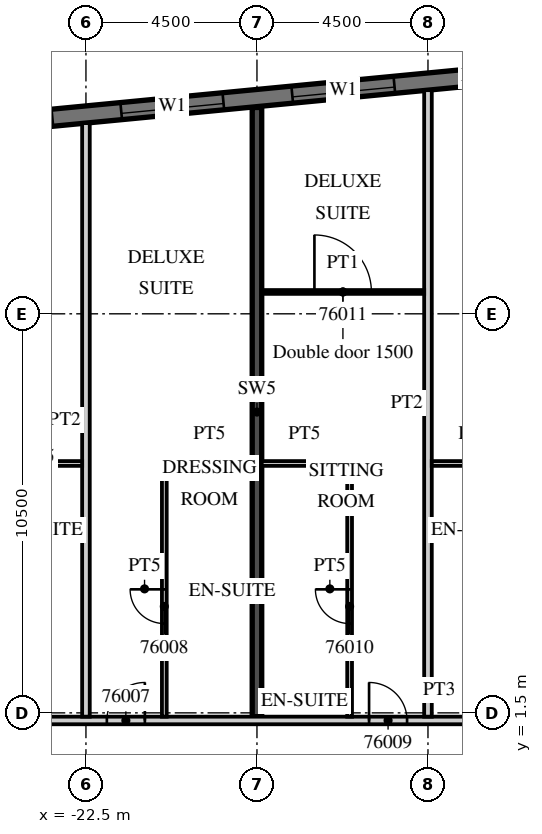
"""IFC4 building model, lengths in metres.
Left out: names, types, materials, properties, quantities, classifications, styles, units other than length and angle.
Written with IfcOpenShell. Run it as: python <this file> out.ifc"""

import sys

from ifc_helpers import new_model, si_unit, direction, frame, frame_2d, origin, place, context, subcontext, project, spatial, rectangle, extrude, element, fill, save


model = new_model("IFC4")
c1 = context("Model", 3, precision=1e-05, world=origin(), true_north=direction((0.0, 1.0)))
c2 = subcontext(c1, "Body", "Model", "MODEL_VIEW")
j1 = project(units=[si_unit("LENGTHUNIT", "METRE"), si_unit("PLANEANGLEUNIT", "RADIAN")], contexts=[c1])
p1 = place(None, origin())
s1 = spatial("IfcSite", under=j1, at=p1, CompositionType="ELEMENT")
p2 = place(p1, origin())
s2 = spatial("IfcBuilding", under=s1, at=p2, CompositionType="ELEMENT")
p3 = place(p2, frame((0.0, 0.0, 301.5)))
s3 = spatial("IfcBuildingStorey", under=s2, at=p3, CompositionType="ELEMENT", Elevation=301.5)
p4 = place(p3, frame((-18.0, 1.4, 0.0), z_axis=(0.0, 0.0, 1.0), x_axis=(0.0, 1.0, 0.0)))
e1 = element("IfcWall", 1, at=p4, inside=s3, PredefinedType="SHEAR", context=c2, shape_type="SweptSolid", body=[
    extrude(rectangle(XDim=16.03, YDim=0.25, at=frame_2d((8.015, 0.0))), origin(), (0.0, 0.0, 1.0), 3.3),
])
p5 = place(p3, frame((13.521, 20.713, 0.0), z_axis=(0.0, 0.0, 1.0), x_axis=(-0.995396277313, -0.095844932638, 0.0)))
e2 = element("IfcWall", 2, at=p5, inside=s3, PredefinedType="SOLIDWALL", context=c2, shape_type="SweptSolid", body=[
    extrude(rectangle(XDim=51.495, YDim=0.45, at=frame_2d((25.748, 0.0))), origin(), (0.0, 0.0, 1.0), 3.02),
])
p6 = place(p5, frame((0.91, 0.0, 0.45)))
e3 = element("IfcOpeningElement", 3, at=p6, cuts=e2, PredefinedType="OPENING", context=c2, shape_type="SweptSolid", body=[
    extrude(rectangle(XDim=2.7, YDim=2.25, at=frame_2d((1.35, 1.125))), frame((0.0, 0.235, 0.0), z_axis=(0.0, -1.0, 0.0), x_axis=(1.0, 0.0, 0.0)), (0.0, 0.0, 1.0), 0.47),
])
p7 = place(p5, frame((5.431, 0.0, 0.45)))
e4 = element("IfcOpeningElement", 4, at=p7, cuts=e2, PredefinedType="OPENING", context=c2, shape_type="SweptSolid", body=[
    extrude(rectangle(XDim=2.7, YDim=2.25, at=frame_2d((1.35, 1.125))), frame((0.0, 0.235, 0.0), z_axis=(0.0, -1.0, 0.0), x_axis=(1.0, 0.0, 0.0)), (0.0, 0.0, 1.0), 0.47),
])
p8 = place(p5, frame((9.952, 0.0, 0.45)))
e5 = element("IfcOpeningElement", 5, at=p8, cuts=e2, PredefinedType="OPENING", context=c2, shape_type="SweptSolid", body=[
    extrude(rectangle(XDim=2.7, YDim=2.25, at=frame_2d((1.35, 1.125))), frame((0.0, 0.235, 0.0), z_axis=(0.0, -1.0, 0.0), x_axis=(1.0, 0.0, 0.0)), (0.0, 0.0, 1.0), 0.47),
])
p9 = place(p5, frame((14.473, 0.0, 0.45)))
e6 = element("IfcOpeningElement", 6, at=p9, cuts=e2, PredefinedType="OPENING", context=c2, shape_type="SweptSolid", body=[
    extrude(rectangle(XDim=2.7, YDim=2.25, at=frame_2d((1.35, 1.125))), frame((0.0, 0.235, 0.0), z_axis=(0.0, -1.0, 0.0), x_axis=(1.0, 0.0, 0.0)), (0.0, 0.0, 1.0), 0.47),
])
p10 = place(p5, frame((18.994, 0.0, 0.45)))
e7 = element("IfcOpeningElement", 7, at=p10, cuts=e2, PredefinedType="OPENING", context=c2, shape_type="SweptSolid", body=[
    extrude(rectangle(XDim=2.7, YDim=2.25, at=frame_2d((1.35, 1.125))), frame((0.0, 0.235, 0.0), z_axis=(0.0, -1.0, 0.0), x_axis=(1.0, 0.0, 0.0)), (0.0, 0.0, 1.0), 0.47),
])
p11 = place(p5, frame((23.514, 0.0, 0.45)))
e8 = element("IfcOpeningElement", 8, at=p11, cuts=e2, PredefinedType="OPENING", context=c2, shape_type="SweptSolid", body=[
    extrude(rectangle(XDim=2.7, YDim=2.25, at=frame_2d((1.35, 1.125))), frame((0.0, 0.235, 0.0), z_axis=(0.0, -1.0, 0.0), x_axis=(1.0, 0.0, 0.0)), (0.0, 0.0, 1.0), 0.47),
])
p12 = place(p5, frame((28.035, 0.0, 0.45)))
e9 = element("IfcOpeningElement", 9, at=p12, cuts=e2, PredefinedType="OPENING", context=c2, shape_type="SweptSolid", body=[
    extrude(rectangle(XDim=2.7, YDim=2.25, at=frame_2d((1.35, 1.125))), frame((0.0, 0.235, 0.0), z_axis=(0.0, -1.0, 0.0), x_axis=(1.0, 0.0, 0.0)), (0.0, 0.0, 1.0), 0.47),
])
p13 = place(p5, frame((32.556, 0.0, 0.45)))
e10 = element("IfcOpeningElement", 10, at=p13, cuts=e2, PredefinedType="OPENING", context=c2, shape_type="SweptSolid", body=[
    extrude(rectangle(XDim=2.7, YDim=2.25, at=frame_2d((1.35, 1.125))), frame((0.0, 0.235, 0.0), z_axis=(0.0, -1.0, 0.0), x_axis=(1.0, 0.0, 0.0)), (0.0, 0.0, 1.0), 0.47),
])
p14 = place(p5, frame((37.077, 0.0, 0.45)))
e11 = element("IfcOpeningElement", 11, at=p14, cuts=e2, PredefinedType="OPENING", context=c2, shape_type="SweptSolid", body=[
    extrude(rectangle(XDim=2.7, YDim=2.25, at=frame_2d((1.35, 1.125))), frame((0.0, 0.235, 0.0), z_axis=(0.0, -1.0, 0.0), x_axis=(1.0, 0.0, 0.0)), (0.0, 0.0, 1.0), 0.47),
])
p15 = place(p5, frame((41.598, 0.0, 0.45)))
e12 = element("IfcOpeningElement", 12, at=p15, cuts=e2, PredefinedType="OPENING", context=c2, shape_type="SweptSolid", body=[
    extrude(rectangle(XDim=2.7, YDim=2.25, at=frame_2d((1.35, 1.125))), frame((0.0, 0.235, 0.0), z_axis=(0.0, -1.0, 0.0), x_axis=(1.0, 0.0, 0.0)), (0.0, 0.0, 1.0), 0.47),
])
p16 = place(p5, frame((46.118, 0.0, 0.45)))
e13 = element("IfcOpeningElement", 13, at=p16, cuts=e2, PredefinedType="OPENING", context=c2, shape_type="SweptSolid", body=[
    extrude(rectangle(XDim=2.7, YDim=2.25, at=frame_2d((1.35, 1.125))), frame((0.0, 0.235, 0.0), z_axis=(0.0, -1.0, 0.0), x_axis=(1.0, 0.0, 0.0)), (0.0, 0.0, 1.0), 0.47),
])
p17 = place(p3, frame((-39.909, 1.3, 0.0), z_axis=(0.0, 0.0, 1.0), x_axis=(1.0, 0.0, 0.0)))
e14 = element("IfcWall", 14, at=p17, inside=s3, PredefinedType="PARTITIONING", context=c2, shape_type="SweptSolid", body=[
    extrude(rectangle(XDim=53.409, YDim=0.2, at=frame_2d((26.705, 0.0))), origin(), (0.0, 0.0, 1.0), 3.02),
])
p18 = place(p17, frame((0.15, 0.0, 0.0)))
e15 = element("IfcOpeningElement", 15, at=p18, cuts=e14, PredefinedType="OPENING", context=c2, shape_type="SweptSolid", body=[
    extrude(rectangle(XDim=0.9, YDim=2.1, at=frame_2d((0.45, 1.05))), frame((0.0, 0.11, 0.0), z_axis=(0.0, -1.0, 0.0), x_axis=(1.0, 0.0, 0.0)), (0.0, 0.0, 1.0), 0.22),
])
p19 = place(p17, frame((9.271, 0.0, 0.0)))
e16 = element("IfcOpeningElement", 16, at=p19, cuts=e14, PredefinedType="OPENING", context=c2, shape_type="SweptSolid", body=[
    extrude(rectangle(XDim=1.2, YDim=2.1, at=frame_2d((0.6, 1.05))), frame((0.0, 0.11, 0.0), z_axis=(0.0, -1.0, 0.0), x_axis=(1.0, 0.0, 0.0)), (0.0, 0.0, 1.0), 0.22),
])
p20 = place(p17, frame((13.484, 0.0, 0.0)))
e17 = element("IfcOpeningElement", 17, at=p20, cuts=e14, PredefinedType="OPENING", context=c2, shape_type="SweptSolid", body=[
    extrude(rectangle(XDim=1.0, YDim=2.1, at=frame_2d((0.5, 1.05))), frame((0.0, 0.11, 0.0), z_axis=(0.0, -1.0, 0.0), x_axis=(1.0, 0.0, 0.0)), (0.0, 0.0, 1.0), 0.22),
])
p21 = place(p17, frame((17.959, 0.0, 0.0)))
e18 = element("IfcOpeningElement", 18, at=p21, cuts=e14, PredefinedType="OPENING", context=c2, shape_type="SweptSolid", body=[
    extrude(rectangle(XDim=1.0, YDim=2.1, at=frame_2d((0.5, 1.05))), frame((0.0, 0.11, 0.0), z_axis=(0.0, -1.0, 0.0), x_axis=(1.0, 0.0, 0.0)), (0.0, 0.0, 1.0), 0.22),
])
p22 = place(p17, frame((24.859, 0.0, 0.0)))
e19 = element("IfcOpeningElement", 19, at=p22, cuts=e14, PredefinedType="OPENING", context=c2, shape_type="SweptSolid", body=[
    extrude(rectangle(XDim=1.0, YDim=2.1, at=frame_2d((0.5, 1.05))), frame((0.0, 0.11, 0.0), z_axis=(0.0, -1.0, 0.0), x_axis=(1.0, 0.0, 0.0)), (0.0, 0.0, 1.0), 0.22),
])
p23 = place(p17, frame((29.334, 0.0, 0.0)))
e20 = element("IfcOpeningElement", 20, at=p23, cuts=e14, PredefinedType="OPENING", context=c2, shape_type="SweptSolid", body=[
    extrude(rectangle(XDim=1.0, YDim=2.1, at=frame_2d((0.5, 1.05))), frame((0.0, 0.11, 0.0), z_axis=(0.0, -1.0, 0.0), x_axis=(1.0, 0.0, 0.0)), (0.0, 0.0, 1.0), 0.22),
])
p24 = place(p17, frame((36.271, 0.0, 0.0)))
e21 = element("IfcOpeningElement", 21, at=p24, cuts=e14, PredefinedType="OPENING", context=c2, shape_type="SweptSolid", body=[
    extrude(rectangle(XDim=1.2, YDim=2.1, at=frame_2d((0.6, 1.05))), frame((0.0, 0.11, 0.0), z_axis=(0.0, -1.0, 0.0), x_axis=(1.0, 0.0, 0.0)), (0.0, 0.0, 1.0), 0.22),
])
p25 = place(p17, frame((40.484, 0.0, 0.0)))
e22 = element("IfcOpeningElement", 22, at=p25, cuts=e14, PredefinedType="OPENING", context=c2, shape_type="SweptSolid", body=[
    extrude(rectangle(XDim=1.0, YDim=2.1, at=frame_2d((0.5, 1.05))), frame((0.0, 0.11, 0.0), z_axis=(0.0, -1.0, 0.0), x_axis=(1.0, 0.0, 0.0)), (0.0, 0.0, 1.0), 0.22),
])
p26 = place(p17, frame((47.334, 0.0, 0.0)))
e23 = element("IfcOpeningElement", 23, at=p26, cuts=e14, PredefinedType="OPENING", context=c2, shape_type="SweptSolid", body=[
    extrude(rectangle(XDim=1.0, YDim=2.1, at=frame_2d((0.5, 1.05))), frame((0.0, 0.11, 0.0), z_axis=(0.0, -1.0, 0.0), x_axis=(1.0, 0.0, 0.0)), (0.0, 0.0, 1.0), 0.22),
])
p27 = place(p17, frame((51.834, 0.0, 0.0)))
e24 = element("IfcOpeningElement", 24, at=p27, cuts=e14, PredefinedType="OPENING", context=c2, shape_type="SweptSolid", body=[
    extrude(rectangle(XDim=1.0, YDim=2.1, at=frame_2d((0.5, 1.05))), frame((0.0, 0.11, 0.0), z_axis=(0.0, -1.0, 0.0), x_axis=(1.0, 0.0, 0.0)), (0.0, 0.0, 1.0), 0.22),
])
p28 = place(p3, frame((-22.5, 1.4, 0.0), z_axis=(0.0, 0.0, 1.0), x_axis=(0.0, 1.0, 0.0)))
e25 = element("IfcWall", 25, at=p28, inside=s3, PredefinedType="PARTITIONING", context=c2, shape_type="SweptSolid", body=[
    extrude(rectangle(XDim=15.618, YDim=0.2, at=frame_2d((7.809, 0.0))), origin(), (0.0, 0.0, 1.0), 3.02),
])
p29 = place(p3, frame((-24.85, 8.062, 0.0), z_axis=(0.0, 0.0, 1.0), x_axis=(1.0, 0.0, 0.0)))
e26 = element("IfcWall", 26, at=p29, inside=s3, PredefinedType="PARTITIONING", context=c2, shape_type="SweptSolid", body=[
    extrude(rectangle(XDim=2.25, YDim=0.125, at=frame_2d((1.125, 0.0))), origin(), (0.0, 0.0, 1.0), 3.02),
])
p30 = place(p3, frame((-20.438, 1.4, 0.0), z_axis=(0.0, 0.0, 1.0), x_axis=(0.0, 1.0, 0.0)))
e27 = element("IfcWall", 27, at=p30, inside=s3, PredefinedType="PARTITIONING", context=c2, shape_type="SweptSolid", body=[
    extrude(rectangle(XDim=6.725, YDim=0.125, at=frame_2d((3.363, 0.0))), origin(), (0.0, 0.0, 1.0), 3.02),
])
p31 = place(p30, frame((2.45, 0.0, 0.0)))
e28 = element("IfcOpeningElement", 28, at=p31, cuts=e27, PredefinedType="OPENING", context=c2, shape_type="SweptSolid", body=[
    extrude(rectangle(XDim=0.9, YDim=2.1, at=frame_2d((0.45, 1.05))), frame((0.0, 0.073, 0.0), z_axis=(0.0, -1.0, 0.0), x_axis=(1.0, 0.0, 0.0)), (0.0, 0.0, 1.0), 0.145),
])
p32 = place(p3, frame((-20.375, 8.062, 0.0), z_axis=(0.0, 0.0, 1.0), x_axis=(1.0, 0.0, 0.0)))
e29 = element("IfcWall", 29, at=p32, inside=s3, PredefinedType="PARTITIONING", context=c2, shape_type="SweptSolid", body=[
    extrude(rectangle(XDim=2.25, YDim=0.125, at=frame_2d((1.125, 0.0))), origin(), (0.0, 0.0, 1.0), 3.02),
])
p33 = place(p3, frame((-13.5, 1.4, 0.0), z_axis=(0.0, 0.0, 1.0), x_axis=(0.0, 1.0, 0.0)))
e30 = element("IfcWall", 30, at=p33, inside=s3, PredefinedType="PARTITIONING", context=c2, shape_type="SweptSolid", body=[
    extrude(rectangle(XDim=16.485, YDim=0.2, at=frame_2d((8.243, 0.0))), origin(), (0.0, 0.0, 1.0), 3.02),
])
p34 = place(p3, frame((-15.562, 1.4, 0.0), z_axis=(0.0, 0.0, 1.0), x_axis=(0.0, 1.0, 0.0)))
e31 = element("IfcWall", 31, at=p34, inside=s3, PredefinedType="PARTITIONING", context=c2, shape_type="SweptSolid", body=[
    extrude(rectangle(XDim=6.725, YDim=0.125, at=frame_2d((3.363, 0.0))), origin(), (0.0, 0.0, 1.0), 3.02),
])
p35 = place(p34, frame((2.45, 0.0, 0.0)))
e32 = element("IfcOpeningElement", 32, at=p35, cuts=e31, PredefinedType="OPENING", context=c2, shape_type="SweptSolid", body=[
    extrude(rectangle(XDim=0.9, YDim=2.1, at=frame_2d((0.45, 1.05))), frame((0.0, 0.073, 0.0), z_axis=(0.0, -1.0, 0.0), x_axis=(1.0, 0.0, 0.0)), (0.0, 0.0, 1.0), 0.145),
])
p36 = place(p3, frame((-17.875, 8.062, 0.0), z_axis=(0.0, 0.0, 1.0), x_axis=(1.0, 0.0, 0.0)))
e33 = element("IfcWall", 33, at=p36, inside=s3, PredefinedType="PARTITIONING", context=c2, shape_type="SweptSolid", body=[
    extrude(rectangle(XDim=2.25, YDim=0.125, at=frame_2d((1.125, 0.0))), origin(), (0.0, 0.0, 1.0), 3.02),
])
p37 = place(p3, frame((-17.875, 12.575, 0.0), z_axis=(0.0, 0.0, 1.0), x_axis=(1.0, 0.0, 0.0)))
e34 = element("IfcWall", 34, at=p37, inside=s3, PredefinedType="PARTITIONING", context=c2, shape_type="SweptSolid", body=[
    extrude(rectangle(XDim=4.275, YDim=0.1, at=frame_2d((2.137, 0.0))), origin(), (0.0, 0.0, 1.0), 3.02),
])
p38 = place(p37, frame((1.387, 0.0, 0.0)))
e35 = element("IfcOpeningElement", 35, at=p38, cuts=e34, PredefinedType="OPENING", context=c2, shape_type="SweptSolid", body=[
    extrude(rectangle(XDim=1.5, YDim=2.1, at=frame_2d((0.75, 1.05))), frame((0.0, 0.06, 0.0), z_axis=(0.0, -1.0, 0.0), x_axis=(1.0, 0.0, 0.0)), (0.0, 0.0, 1.0), 0.12),
])
p39 = place(p3, frame((-13.4, 8.062, 0.0), z_axis=(0.0, 0.0, 1.0), x_axis=(1.0, 0.0, 0.0)))
e36 = element("IfcWall", 36, at=p39, inside=s3, PredefinedType="PARTITIONING", context=c2, shape_type="SweptSolid", body=[
    extrude(rectangle(XDim=2.25, YDim=0.125, at=frame_2d((1.125, 0.0))), origin(), (0.0, 0.0, 1.0), 3.02),
])
p40 = place(p12, origin())
e37 = element("IfcWindow", 37, at=p40, inside=s3, PartitioningType="SINGLE_PANEL", PredefinedType="WINDOW", context=c2, shape_type="SweptSolid", body=[
    extrude(rectangle(XDim=2.7, YDim=2.25, at=frame_2d((1.35, 1.125))), frame((0.0, 0.09, 0.0), z_axis=(0.0, -1.0, 0.0), x_axis=(1.0, 0.0, 0.0)), (0.0, 0.0, 1.0), 0.06),
])
fill(e9, e37)
p41 = place(p13, origin())
e38 = element("IfcWindow", 38, at=p41, inside=s3, PartitioningType="SINGLE_PANEL", PredefinedType="WINDOW", context=c2, shape_type="SweptSolid", body=[
    extrude(rectangle(XDim=2.7, YDim=2.25, at=frame_2d((1.35, 1.125))), frame((0.0, 0.09, 0.0), z_axis=(0.0, -1.0, 0.0), x_axis=(1.0, 0.0, 0.0)), (0.0, 0.0, 1.0), 0.06),
])
fill(e10, e38)
p42 = place(p14, origin())
e39 = element("IfcWindow", 39, at=p42, inside=s3, PartitioningType="SINGLE_PANEL", PredefinedType="WINDOW", context=c2, shape_type="SweptSolid", body=[
    extrude(rectangle(XDim=2.7, YDim=2.25, at=frame_2d((1.35, 1.125))), frame((0.0, 0.09, 0.0), z_axis=(0.0, -1.0, 0.0), x_axis=(1.0, 0.0, 0.0)), (0.0, 0.0, 1.0), 0.06),
])
fill(e11, e39)
p43 = place(p21, origin())
e40 = element("IfcDoor", 40, at=p43, inside=s3, OperationType="SINGLE_SWING_RIGHT", PredefinedType="DOOR", context=c2, shape_type="SweptSolid", body=[
    extrude(rectangle(XDim=1.0, YDim=2.1, at=frame_2d((0.5, 1.05))), frame((0.0, 0.025, 0.0), z_axis=(0.0, -1.0, 0.0), x_axis=(1.0, 0.0, 0.0)), (0.0, 0.0, 1.0), 0.05),
])
fill(e18, e40)
p44 = place(p31, origin())
e41 = element("IfcDoor", 41, at=p44, inside=s3, OperationType="SINGLE_SWING_RIGHT", PredefinedType="DOOR", context=c2, shape_type="SweptSolid", body=[
    extrude(rectangle(XDim=0.9, YDim=2.1, at=frame_2d((0.45, 1.05))), frame((0.0, 0.025, 0.0), z_axis=(0.0, -1.0, 0.0), x_axis=(1.0, 0.0, 0.0)), (0.0, 0.0, 1.0), 0.05),
])
fill(e28, e41)
p45 = place(p22, origin())
e42 = element("IfcDoor", 42, at=p45, inside=s3, OperationType="SINGLE_SWING_LEFT", PredefinedType="DOOR", context=c2, shape_type="SweptSolid", body=[
    extrude(rectangle(XDim=1.0, YDim=2.1, at=frame_2d((0.5, 1.05))), frame((0.0, 0.025, 0.0), z_axis=(0.0, -1.0, 0.0), x_axis=(1.0, 0.0, 0.0)), (0.0, 0.0, 1.0), 0.05),
])
fill(e19, e42)
p46 = place(p35, origin())
e43 = element("IfcDoor", 43, at=p46, inside=s3, OperationType="SINGLE_SWING_RIGHT", PredefinedType="DOOR", context=c2, shape_type="SweptSolid", body=[
    extrude(rectangle(XDim=0.9, YDim=2.1, at=frame_2d((0.45, 1.05))), frame((0.0, 0.025, 0.0), z_axis=(0.0, -1.0, 0.0), x_axis=(1.0, 0.0, 0.0)), (0.0, 0.0, 1.0), 0.05),
])
fill(e32, e43)
p47 = place(p38, origin())
e44 = element("IfcDoor", 44, at=p47, inside=s3, OperationType="SINGLE_SWING_LEFT", PredefinedType="DOOR", context=c2, shape_type="SweptSolid", body=[
    extrude(rectangle(XDim=1.5, YDim=2.1, at=frame_2d((0.75, 1.05))), frame((0.0, 0.025, 0.0), z_axis=(0.0, -1.0, 0.0), x_axis=(1.0, 0.0, 0.0)), (0.0, 0.0, 1.0), 0.05),
])
fill(e35, e44)
save(model, sys.argv[1])
